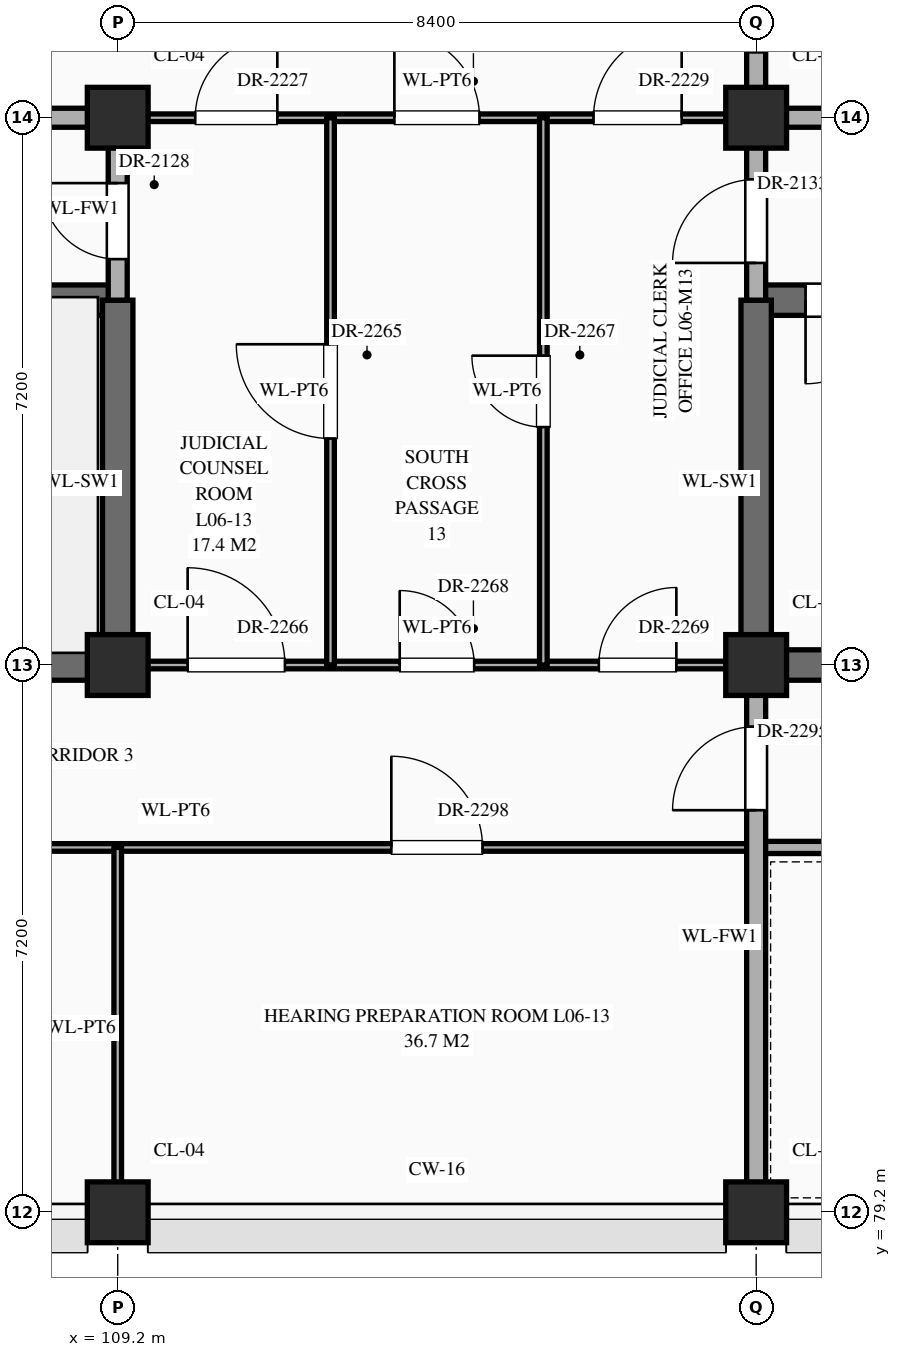
"""IFC4 building model, lengths in metres.
Left out: names, types, materials, properties, quantities, classifications, styles, units other than length and angle.
Written with IfcOpenShell. Run it as: python <this file> out.ifc"""

import sys

from ifc_helpers import new_model, si_unit, direction, frame, frame_2d, origin, origin_2d, place, context, subcontext, project, spatial, rectangle, extrude, element, fill, save


model = new_model("IFC4")
c1 = context("Model", 3, precision=1e-05, world=origin(), true_north=direction((0.0, 1.0)))
c2 = subcontext(c1, "Body", "Model", "MODEL_VIEW")
j1 = project(units=[si_unit("LENGTHUNIT", "METRE"), si_unit("PLANEANGLEUNIT", "RADIAN")], contexts=[c1])
p1 = place(None, origin())
s1 = spatial("IfcSite", under=j1, at=p1, CompositionType="ELEMENT")
p2 = place(p1, origin())
s2 = spatial("IfcBuilding", under=s1, at=p2, CompositionType="ELEMENT")
p3 = place(p2, frame((0.0, 0.0, 26.1)))
s3 = spatial("IfcBuildingStorey", under=s2, at=p3, CompositionType="ELEMENT", Elevation=26.1)
for number, where, z_axis, x_axis in (
    (1, (109.2, 79.2, 0.0), (0.0, 0.0, 1.0), (1.0, 0.0, 0.0)),
    (2, (109.2, 86.4, 0.0), (0.0, 0.0, 1.0), (1.0, 0.0, 0.0)),
    (3, (109.2, 93.6, 0.0), (0.0, 0.0, 1.0), (1.0, 0.0, 0.0)),
    (4, (117.6, 79.2, 0.0), (0.0, 0.0, 1.0), (1.0, 0.0, 0.0)),
    (5, (117.6, 86.4, 0.0), (0.0, 0.0, 1.0), (1.0, 0.0, 0.0)),
    (6, (117.6, 93.6, 0.0), (0.0, 0.0, 1.0), (1.0, 0.0, 0.0)),
):
    element("IfcColumn", number, at=place(p3, frame(where, z_axis=z_axis, x_axis=x_axis)), inside=s3, PredefinedType="COLUMN", context=c2, shape_type="SweptSolid", body=[
        extrude(rectangle(XDim=0.8, YDim=0.8, at=origin_2d()), origin(), (0.0, 0.0, 1.0), 4.5),
    ])
p4 = place(p3, frame((100.8, 84.0, 0.0), z_axis=(0.0, 0.0, 1.0), x_axis=(1.0, 0.0, 0.0)))
e7 = element("IfcWall", 7, at=p4, inside=s3, PredefinedType="STANDARD", context=c2, shape_type="SweptSolid", body=[
    extrude(rectangle(XDim=16.8, YDim=0.1, at=frame_2d((8.4, 0.0))), origin(), (0.0, 0.0, 1.0), 4.24),
])
p5 = place(p4, frame((3.62, 0.0, 0.0)))
e8 = element("IfcOpeningElement", 8, at=p5, cuts=e7, PredefinedType="OPENING", context=c2, shape_type="SweptSolid", body=[
    extrude(rectangle(XDim=1.16, YDim=2.3, at=frame_2d((0.58, 1.15))), frame((0.0, 0.062, 0.0), z_axis=(0.0, -1.0, 0.0), x_axis=(1.0, 0.0, 0.0)), (0.0, 0.0, 1.0), 0.124),
])
p6 = place(p4, frame((12.0, 0.0, 0.0)))
e9 = element("IfcOpeningElement", 9, at=p6, cuts=e7, PredefinedType="OPENING", context=c2, shape_type="SweptSolid", body=[
    extrude(rectangle(XDim=1.2, YDim=2.35, at=frame_2d((0.6, 1.175))), frame((0.0, 0.062, 0.0), z_axis=(0.0, -1.0, 0.0), x_axis=(1.0, 0.0, 0.0)), (0.0, 0.0, 1.0), 0.124),
])
p7 = place(p3, frame((117.6, 84.0, 0.0), z_axis=(0.0, 0.0, 1.0), x_axis=(1.0, 0.0, 0.0)))
e10 = element("IfcWall", 10, at=p7, inside=s3, PredefinedType="STANDARD", context=c2, shape_type="SweptSolid", body=[
    extrude(rectangle(XDim=16.8, YDim=0.16, at=frame_2d((8.4, 0.0))), origin(), (0.0, 0.0, 1.0), 4.24),
])
p8 = place(p7, frame((7.575, 0.0, 0.0)))
e11 = element("IfcOpeningElement", 11, at=p8, cuts=e10, PredefinedType="OPENING", context=c2, shape_type="SweptSolid", body=[
    extrude(rectangle(XDim=1.65, YDim=2.4, at=frame_2d((0.825, 1.2))), frame((0.0, 0.092, 0.0), z_axis=(0.0, -1.0, 0.0), x_axis=(1.0, 0.0, 0.0)), (0.0, 0.0, 1.0), 0.184),
])
p9 = place(p3, frame((100.8, 86.4, 0.0), z_axis=(0.0, 0.0, 1.0), x_axis=(1.0, 0.0, 0.0)))
e12 = element("IfcWall", 12, at=p9, inside=s3, PredefinedType="SHEAR", context=c2, shape_type="SweptSolid", body=[
    extrude(rectangle(XDim=8.4, YDim=0.4, at=frame_2d((4.2, 0.0))), origin(), (0.0, 0.0, 1.0), 4.24),
])
p10 = place(p3, frame((109.2, 86.4, 0.0), z_axis=(0.0, 0.0, 1.0), x_axis=(1.0, 0.0, 0.0)))
e13 = element("IfcWall", 13, at=p10, inside=s3, PredefinedType="STANDARD", context=c2, shape_type="SweptSolid", body=[
    extrude(rectangle(XDim=8.4, YDim=0.1, at=frame_2d((4.2, 0.0))), origin(), (0.0, 0.0, 1.0), 3.39),
])
p11 = place(p10, frame((0.92, 0.0, 0.0)))
e14 = element("IfcOpeningElement", 14, at=p11, cuts=e13, PredefinedType="OPENING", context=c2, shape_type="SweptSolid", body=[
    extrude(rectangle(XDim=1.28, YDim=2.35, at=frame_2d((0.64, 1.175))), frame((0.0, 0.062, 0.0), z_axis=(0.0, -1.0, 0.0), x_axis=(1.0, 0.0, 0.0)), (0.0, 0.0, 1.0), 0.124),
])
p12 = place(p10, frame((3.71, 0.0, 0.0)))
e15 = element("IfcOpeningElement", 15, at=p12, cuts=e13, PredefinedType="OPENING", context=c2, shape_type="SweptSolid", body=[
    extrude(rectangle(XDim=0.98, YDim=2.35, at=frame_2d((0.49, 1.175))), frame((0.0, 0.062, 0.0), z_axis=(0.0, -1.0, 0.0), x_axis=(1.0, 0.0, 0.0)), (0.0, 0.0, 1.0), 0.124),
])
p13 = place(p10, frame((6.33, 0.0, 0.0)))
e16 = element("IfcOpeningElement", 16, at=p13, cuts=e13, PredefinedType="OPENING", context=c2, shape_type="SweptSolid", body=[
    extrude(rectangle(XDim=1.02, YDim=2.4, at=frame_2d((0.51, 1.2))), frame((0.0, 0.062, 0.0), z_axis=(0.0, -1.0, 0.0), x_axis=(1.0, 0.0, 0.0)), (0.0, 0.0, 1.0), 0.124),
])
p14 = place(p3, frame((117.6, 86.4, 0.0), z_axis=(0.0, 0.0, 1.0), x_axis=(1.0, 0.0, 0.0)))
e17 = element("IfcWall", 17, at=p14, inside=s3, PredefinedType="SHEAR", context=c2, shape_type="SweptSolid", body=[
    extrude(rectangle(XDim=8.4, YDim=0.4, at=frame_2d((4.2, 0.0))), origin(), (0.0, 0.0, 1.0), 4.24),
])
p15 = place(p3, frame((100.8, 91.2, 0.0), z_axis=(0.0, 0.0, 1.0), x_axis=(1.0, 0.0, 0.0)))
e18 = element("IfcWall", 18, at=p15, inside=s3, PredefinedType="SHEAR", context=c2, shape_type="SweptSolid", body=[
    extrude(rectangle(XDim=8.4, YDim=0.4, at=frame_2d((4.2, 0.0))), origin(), (0.0, 0.0, 1.0), 4.24),
])
p16 = place(p15, frame((0.65, 0.0, 0.0)))
e19 = element("IfcOpeningElement", 19, at=p16, cuts=e18, PredefinedType="OPENING", context=c2, shape_type="SweptSolid", body=[
    extrude(rectangle(XDim=1.1, YDim=2.2, at=frame_2d((0.55, 1.1))), frame((0.0, 0.212, 0.0), z_axis=(0.0, -1.0, 0.0), x_axis=(1.0, 0.0, 0.0)), (0.0, 0.0, 1.0), 0.424),
])
p17 = place(p3, frame((117.6, 91.2, 0.0), z_axis=(0.0, 0.0, 1.0), x_axis=(1.0, 0.0, 0.0)))
e20 = element("IfcWall", 20, at=p17, inside=s3, PredefinedType="SHEAR", context=c2, shape_type="SweptSolid", body=[
    extrude(rectangle(XDim=8.4, YDim=0.4, at=frame_2d((4.2, 0.0))), origin(), (0.0, 0.0, 1.0), 4.24),
])
p18 = place(p17, frame((0.65, 0.0, 0.0)))
e21 = element("IfcOpeningElement", 21, at=p18, cuts=e20, PredefinedType="OPENING", context=c2, shape_type="SweptSolid", body=[
    extrude(rectangle(XDim=1.1, YDim=2.2, at=frame_2d((0.55, 1.1))), frame((0.0, 0.212, 0.0), z_axis=(0.0, -1.0, 0.0), x_axis=(1.0, 0.0, 0.0)), (0.0, 0.0, 1.0), 0.424),
])
p19 = place(p3, frame((100.8, 93.6, 0.0), z_axis=(0.0, 0.0, 1.0), x_axis=(1.0, 0.0, 0.0)))
e22 = element("IfcWall", 22, at=p19, inside=s3, PredefinedType="STANDARD", context=c2, shape_type="SweptSolid", body=[
    extrude(rectangle(XDim=8.4, YDim=0.25, at=frame_2d((4.2, 0.0))), origin(), (0.0, 0.0, 1.0), 3.39),
])
p20 = place(p19, frame((3.3, 0.0, 0.0)))
e23 = element("IfcOpeningElement", 23, at=p20, cuts=e22, PredefinedType="OPENING", context=c2, shape_type="SweptSolid", body=[
    extrude(rectangle(XDim=1.8, YDim=2.35, at=frame_2d((0.9, 1.175))), frame((0.0, 0.137, 0.0), z_axis=(0.0, -1.0, 0.0), x_axis=(1.0, 0.0, 0.0)), (0.0, 0.0, 1.0), 0.274),
])
p21 = place(p3, frame((109.2, 93.6, 0.0), z_axis=(0.0, 0.0, 1.0), x_axis=(1.0, 0.0, 0.0)))
e24 = element("IfcWall", 24, at=p21, inside=s3, PredefinedType="STANDARD", context=c2, shape_type="SweptSolid", body=[
    extrude(rectangle(XDim=8.4, YDim=0.1, at=frame_2d((4.2, 0.0))), origin(), (0.0, 0.0, 1.0), 3.39),
])
p22 = place(p21, frame((1.02, 0.0, 0.0)))
e25 = element("IfcOpeningElement", 25, at=p22, cuts=e24, PredefinedType="OPENING", context=c2, shape_type="SweptSolid", body=[
    extrude(rectangle(XDim=1.08, YDim=2.25, at=frame_2d((0.54, 1.125))), frame((0.0, 0.062, 0.0), z_axis=(0.0, -1.0, 0.0), x_axis=(1.0, 0.0, 0.0)), (0.0, 0.0, 1.0), 0.124),
])
p23 = place(p21, frame((3.64, 0.0, 0.0)))
e26 = element("IfcOpeningElement", 26, at=p23, cuts=e24, PredefinedType="OPENING", context=c2, shape_type="SweptSolid", body=[
    extrude(rectangle(XDim=1.12, YDim=2.25, at=frame_2d((0.56, 1.125))), frame((0.0, 0.062, 0.0), z_axis=(0.0, -1.0, 0.0), x_axis=(1.0, 0.0, 0.0)), (0.0, 0.0, 1.0), 0.124),
])
p24 = place(p21, frame((6.26, 0.0, 0.0)))
e27 = element("IfcOpeningElement", 27, at=p24, cuts=e24, PredefinedType="OPENING", context=c2, shape_type="SweptSolid", body=[
    extrude(rectangle(XDim=1.16, YDim=2.3, at=frame_2d((0.58, 1.15))), frame((0.0, 0.062, 0.0), z_axis=(0.0, -1.0, 0.0), x_axis=(1.0, 0.0, 0.0)), (0.0, 0.0, 1.0), 0.124),
])
p25 = place(p3, frame((117.6, 93.6, 0.0), z_axis=(0.0, 0.0, 1.0), x_axis=(1.0, 0.0, 0.0)))
e28 = element("IfcWall", 28, at=p25, inside=s3, PredefinedType="STANDARD", context=c2, shape_type="SweptSolid", body=[
    extrude(rectangle(XDim=8.4, YDim=0.25, at=frame_2d((4.2, 0.0))), origin(), (0.0, 0.0, 1.0), 3.39),
])
p26 = place(p25, frame((3.45, 0.0, 0.0)))
e29 = element("IfcOpeningElement", 29, at=p26, cuts=e28, PredefinedType="OPENING", context=c2, shape_type="SweptSolid", body=[
    extrude(rectangle(XDim=1.5, YDim=2.25, at=frame_2d((0.75, 1.125))), frame((0.0, 0.137, 0.0), z_axis=(0.0, -1.0, 0.0), x_axis=(1.0, 0.0, 0.0)), (0.0, 0.0, 1.0), 0.274),
])
p27 = place(p3, frame((109.2, 79.24, 0.0), z_axis=(0.0, 0.0, 1.0), x_axis=(0.0, 1.0, 0.0)))
e30 = element("IfcWall", 30, at=p27, inside=s3, PredefinedType="STANDARD", context=c2, shape_type="SweptSolid", body=[
    extrude(rectangle(XDim=4.76, YDim=0.1, at=frame_2d((2.38, 0.0))), origin(), (0.0, 0.0, 1.0), 3.49),
])
p28 = place(p3, frame((109.2, 86.4, 0.0), z_axis=(0.0, 0.0, 1.0), x_axis=(0.0, 1.0, 0.0)))
e31 = element("IfcWall", 31, at=p28, inside=s3, PredefinedType="SHEAR", context=c2, shape_type="SweptSolid", body=[
    extrude(rectangle(XDim=4.8, YDim=0.4, at=frame_2d((2.4, 0.0))), origin(), (0.0, 0.0, 1.0), 4.24),
])
p29 = place(p3, frame((109.2, 91.2, 0.0), z_axis=(0.0, 0.0, 1.0), x_axis=(0.0, 1.0, 0.0)))
e32 = element("IfcWall", 32, at=p29, inside=s3, PredefinedType="STANDARD", context=c2, shape_type="SweptSolid", body=[
    extrude(rectangle(XDim=2.4, YDim=0.25, at=frame_2d((1.2, 0.0))), origin(), (0.0, 0.0, 1.0), 3.49),
])
p30 = place(p29, frame((0.54, 0.0, 0.0)))
e33 = element("IfcOpeningElement", 33, at=p30, cuts=e32, PredefinedType="OPENING", context=c2, shape_type="SweptSolid", body=[
    extrude(rectangle(XDim=1.0, YDim=2.2, at=frame_2d((0.5, 1.1))), frame((0.0, 0.137, 0.0), z_axis=(0.0, -1.0, 0.0), x_axis=(1.0, 0.0, 0.0)), (0.0, 0.0, 1.0), 0.274),
])
p31 = place(p3, frame((112.0, 86.4, 0.0), z_axis=(0.0, 0.0, 1.0), x_axis=(0.0, 1.0, 0.0)))
e34 = element("IfcWall", 34, at=p31, inside=s3, PredefinedType="STANDARD", context=c2, shape_type="SweptSolid", body=[
    extrude(rectangle(XDim=7.2, YDim=0.1, at=frame_2d((3.6, 0.0))), origin(), (0.0, 0.0, 1.0), 4.24),
])
p32 = place(p31, frame((2.98, 0.0, 0.0)))
e35 = element("IfcOpeningElement", 35, at=p32, cuts=e34, PredefinedType="OPENING", context=c2, shape_type="SweptSolid", body=[
    extrude(rectangle(XDim=1.24, YDim=2.3, at=frame_2d((0.62, 1.15))), frame((0.0, 0.062, 0.0), z_axis=(0.0, -1.0, 0.0), x_axis=(1.0, 0.0, 0.0)), (0.0, 0.0, 1.0), 0.124),
])
p33 = place(p3, frame((114.8, 86.4, 0.0), z_axis=(0.0, 0.0, 1.0), x_axis=(0.0, 1.0, 0.0)))
e36 = element("IfcWall", 36, at=p33, inside=s3, PredefinedType="STANDARD", context=c2, shape_type="SweptSolid", body=[
    extrude(rectangle(XDim=7.2, YDim=0.1, at=frame_2d((3.6, 0.0))), origin(), (0.0, 0.0, 1.0), 4.24),
])
p34 = place(p33, frame((3.13, 0.0, 0.0)))
e37 = element("IfcOpeningElement", 37, at=p34, cuts=e36, PredefinedType="OPENING", context=c2, shape_type="SweptSolid", body=[
    extrude(rectangle(XDim=0.94, YDim=2.3, at=frame_2d((0.47, 1.15))), frame((0.0, 0.062, 0.0), z_axis=(0.0, -1.0, 0.0), x_axis=(1.0, 0.0, 0.0)), (0.0, 0.0, 1.0), 0.124),
])
p35 = place(p3, frame((117.6, 79.24, 0.0), z_axis=(0.0, 0.0, 1.0), x_axis=(0.0, 1.0, 0.0)))
e38 = element("IfcWall", 38, at=p35, inside=s3, PredefinedType="STANDARD", context=c2, shape_type="SweptSolid", body=[
    extrude(rectangle(XDim=7.16, YDim=0.25, at=frame_2d((3.58, 0.0))), origin(), (0.0, 0.0, 1.0), 3.49),
])
p36 = place(p35, frame((5.25, 0.0, 0.0)))
e39 = element("IfcOpeningElement", 39, at=p36, cuts=e38, PredefinedType="OPENING", context=c2, shape_type="SweptSolid", body=[
    extrude(rectangle(XDim=1.1, YDim=2.2, at=frame_2d((0.55, 1.1))), frame((0.0, 0.137, 0.0), z_axis=(0.0, -1.0, 0.0), x_axis=(1.0, 0.0, 0.0)), (0.0, 0.0, 1.0), 0.274),
])
p37 = place(p3, frame((117.6, 86.4, 0.0), z_axis=(0.0, 0.0, 1.0), x_axis=(0.0, 1.0, 0.0)))
e40 = element("IfcWall", 40, at=p37, inside=s3, PredefinedType="SHEAR", context=c2, shape_type="SweptSolid", body=[
    extrude(rectangle(XDim=4.8, YDim=0.4, at=frame_2d((2.4, 0.0))), origin(), (0.0, 0.0, 1.0), 4.24),
])
p38 = place(p3, frame((117.6, 91.2, 0.0), z_axis=(0.0, 0.0, 1.0), x_axis=(0.0, 1.0, 0.0)))
e41 = element("IfcWall", 41, at=p38, inside=s3, PredefinedType="STANDARD", context=c2, shape_type="SweptSolid", body=[
    extrude(rectangle(XDim=13.2, YDim=0.25, at=frame_2d((6.6, 0.0))), origin(), (0.0, 0.0, 1.0), 3.49),
])
p39 = place(p38, frame((0.49, 0.0, 0.0)))
e42 = element("IfcOpeningElement", 42, at=p39, cuts=e41, PredefinedType="OPENING", context=c2, shape_type="SweptSolid", body=[
    extrude(rectangle(XDim=1.1, YDim=2.2, at=frame_2d((0.55, 1.1))), frame((0.0, 0.137, 0.0), z_axis=(0.0, -1.0, 0.0), x_axis=(1.0, 0.0, 0.0)), (0.0, 0.0, 1.0), 0.274),
])
p40 = place(p38, frame((10.46, 0.0, 0.0)))
e43 = element("IfcOpeningElement", 43, at=p40, cuts=e41, PredefinedType="OPENING", context=c2, shape_type="SweptSolid", body=[
    extrude(rectangle(XDim=1.0, YDim=2.2, at=frame_2d((0.5, 1.1))), frame((0.0, 0.137, 0.0), z_axis=(0.0, -1.0, 0.0), x_axis=(1.0, 0.0, 0.0)), (0.0, 0.0, 1.0), 0.274),
])
p41 = place(p38, frame((3.26, 0.0, 0.0)))
e44 = element("IfcOpeningElement", 44, at=p41, cuts=e41, PredefinedType="OPENING", context=c2, shape_type="SweptSolid", body=[
    extrude(rectangle(XDim=1.0, YDim=2.2, at=frame_2d((0.5, 1.1))), frame((0.0, 0.137, 0.0), z_axis=(0.0, -1.0, 0.0), x_axis=(1.0, 0.0, 0.0)), (0.0, 0.0, 1.0), 0.274),
])
p42 = place(p18, frame((1.1, 0.0, 0.0), z_axis=(0.0, 0.0, 1.0), x_axis=(-1.0, 0.0, 0.0)))
e45 = element("IfcDoor", 45, at=p42, inside=s3, OperationType="SINGLE_SWING_RIGHT", PredefinedType="DOOR", context=c2, shape_type="SweptSolid", body=[
    extrude(rectangle(XDim=1.1, YDim=2.2, at=frame_2d((0.55, 1.1))), frame((0.0, 0.025, 0.0), z_axis=(0.0, -1.0, 0.0), x_axis=(1.0, 0.0, 0.0)), (0.0, 0.0, 1.0), 0.05),
])
fill(e21, e45)
p43 = place(p30, origin())
e46 = element("IfcDoor", 46, at=p43, inside=s3, OperationType="SINGLE_SWING_RIGHT", PredefinedType="DOOR", context=c2, shape_type="SweptSolid", body=[
    extrude(rectangle(XDim=1.0, YDim=2.2, at=frame_2d((0.5, 1.1))), frame((0.0, 0.025, 0.0), z_axis=(0.0, -1.0, 0.0), x_axis=(1.0, 0.0, 0.0)), (0.0, 0.0, 1.0), 0.05),
])
fill(e33, e46)
p44 = place(p39, origin())
e47 = element("IfcDoor", 47, at=p44, inside=s3, OperationType="SINGLE_SWING_LEFT", PredefinedType="DOOR", context=c2, shape_type="SweptSolid", body=[
    extrude(rectangle(XDim=1.1, YDim=2.2, at=frame_2d((0.55, 1.1))), frame((0.0, 0.025, 0.0), z_axis=(0.0, -1.0, 0.0), x_axis=(1.0, 0.0, 0.0)), (0.0, 0.0, 1.0), 0.05),
])
fill(e42, e47)
p45 = place(p22, origin())
e48 = element("IfcDoor", 48, at=p45, inside=s3, OperationType="SINGLE_SWING_RIGHT", PredefinedType="DOOR", context=c2, shape_type="SweptSolid", body=[
    extrude(rectangle(XDim=1.08, YDim=2.25, at=frame_2d((0.54, 1.125))), frame((0.0, 0.025, 0.0), z_axis=(0.0, -1.0, 0.0), x_axis=(1.0, 0.0, 0.0)), (0.0, 0.0, 1.0), 0.05),
])
fill(e25, e48)
p46 = place(p23, origin())
e49 = element("IfcDoor", 49, at=p46, inside=s3, OperationType="SINGLE_SWING_LEFT", PredefinedType="DOOR", context=c2, shape_type="SweptSolid", body=[
    extrude(rectangle(XDim=1.12, YDim=2.25, at=frame_2d((0.56, 1.125))), frame((0.0, 0.025, 0.0), z_axis=(0.0, -1.0, 0.0), x_axis=(1.0, 0.0, 0.0)), (0.0, 0.0, 1.0), 0.05),
])
fill(e26, e49)
p47 = place(p24, origin())
e50 = element("IfcDoor", 50, at=p47, inside=s3, OperationType="SINGLE_SWING_RIGHT", PredefinedType="DOOR", context=c2, shape_type="SweptSolid", body=[
    extrude(rectangle(XDim=1.16, YDim=2.3, at=frame_2d((0.58, 1.15))), frame((0.0, 0.025, 0.0), z_axis=(0.0, -1.0, 0.0), x_axis=(1.0, 0.0, 0.0)), (0.0, 0.0, 1.0), 0.05),
])
fill(e27, e50)
p48 = place(p32, origin())
e51 = element("IfcDoor", 51, at=p48, inside=s3, OperationType="SINGLE_SWING_RIGHT", PredefinedType="DOOR", context=c2, shape_type="SweptSolid", body=[
    extrude(rectangle(XDim=1.24, YDim=2.3, at=frame_2d((0.62, 1.15))), frame((0.0, 0.025, 0.0), z_axis=(0.0, -1.0, 0.0), x_axis=(1.0, 0.0, 0.0)), (0.0, 0.0, 1.0), 0.05),
])
fill(e35, e51)
p49 = place(p11, origin())
e52 = element("IfcDoor", 52, at=p49, inside=s3, OperationType="SINGLE_SWING_LEFT", PredefinedType="DOOR", context=c2, shape_type="SweptSolid", body=[
    extrude(rectangle(XDim=1.28, YDim=2.35, at=frame_2d((0.64, 1.175))), frame((0.0, 0.025, 0.0), z_axis=(0.0, -1.0, 0.0), x_axis=(1.0, 0.0, 0.0)), (0.0, 0.0, 1.0), 0.05),
])
fill(e14, e52)
p50 = place(p34, origin())
e53 = element("IfcDoor", 53, at=p50, inside=s3, OperationType="SINGLE_SWING_RIGHT", PredefinedType="DOOR", context=c2, shape_type="SweptSolid", body=[
    extrude(rectangle(XDim=0.94, YDim=2.3, at=frame_2d((0.47, 1.15))), frame((0.0, 0.025, 0.0), z_axis=(0.0, -1.0, 0.0), x_axis=(1.0, 0.0, 0.0)), (0.0, 0.0, 1.0), 0.05),
])
fill(e37, e53)
p51 = place(p12, origin())
e54 = element("IfcDoor", 54, at=p51, inside=s3, OperationType="SINGLE_SWING_LEFT", PredefinedType="DOOR", context=c2, shape_type="SweptSolid", body=[
    extrude(rectangle(XDim=0.98, YDim=2.35, at=frame_2d((0.49, 1.175))), frame((0.0, 0.025, 0.0), z_axis=(0.0, -1.0, 0.0), x_axis=(1.0, 0.0, 0.0)), (0.0, 0.0, 1.0), 0.05),
])
fill(e15, e54)
p52 = place(p13, origin())
e55 = element("IfcDoor", 55, at=p52, inside=s3, OperationType="SINGLE_SWING_RIGHT", PredefinedType="DOOR", context=c2, shape_type="SweptSolid", body=[
    extrude(rectangle(XDim=1.02, YDim=2.4, at=frame_2d((0.51, 1.2))), frame((0.0, 0.025, 0.0), z_axis=(0.0, -1.0, 0.0), x_axis=(1.0, 0.0, 0.0)), (0.0, 0.0, 1.0), 0.05),
])
fill(e16, e55)
p53 = place(p36, origin())
e56 = element("IfcDoor", 56, at=p53, inside=s3, OperationType="SINGLE_SWING_LEFT", PredefinedType="DOOR", context=c2, shape_type="SweptSolid", body=[
    extrude(rectangle(XDim=1.1, YDim=2.2, at=frame_2d((0.55, 1.1))), frame((0.0, 0.025, 0.0), z_axis=(0.0, -1.0, 0.0), x_axis=(1.0, 0.0, 0.0)), (0.0, 0.0, 1.0), 0.05),
])
fill(e39, e56)
p54 = place(p6, origin())
e57 = element("IfcDoor", 57, at=p54, inside=s3, OperationType="SINGLE_SWING_LEFT", PredefinedType="DOOR", context=c2, shape_type="SweptSolid", body=[
    extrude(rectangle(XDim=1.2, YDim=2.35, at=frame_2d((0.6, 1.175))), frame((0.0, 0.025, 0.0), z_axis=(0.0, -1.0, 0.0), x_axis=(1.0, 0.0, 0.0)), (0.0, 0.0, 1.0), 0.05),
])
fill(e9, e57)
save(model, sys.argv[1])
